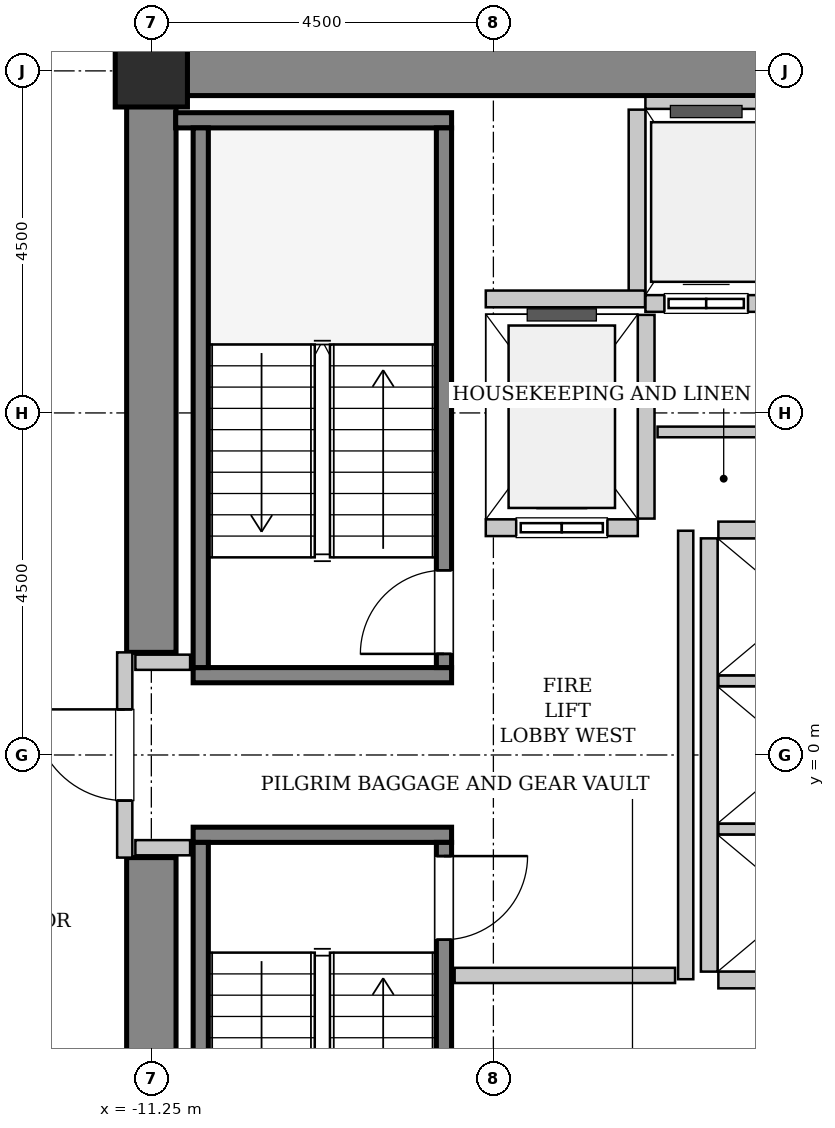
"""IFC4 building model, lengths in metres.
Left out: names, types, materials, properties, quantities, classifications, styles, units other than length and angle.
Written with IfcOpenShell. Run it as: python <this file> out.ifc"""

import sys

from ifc_helpers import new_model, si_unit, direction, frame, frame_2d, origin, origin_2d, place, context, subcontext, project, spatial, rectangle, hollow_rectangle, extrude, source, transform, mapped, element, fill, save


model = new_model("IFC4")
c1 = context("Model", 3, precision=1e-05, world=origin(), true_north=direction((0.0, 1.0)))
c2 = subcontext(c1, "Body", "Model", "MODEL_VIEW")
j1 = project(units=[si_unit("LENGTHUNIT", "METRE"), si_unit("PLANEANGLEUNIT", "RADIAN")], contexts=[c1])
p1 = place(None, origin())
s1 = spatial("IfcSite", under=j1, at=p1, CompositionType="ELEMENT")
p2 = place(p1, origin())
s2 = spatial("IfcBuilding", under=s1, at=p2, CompositionType="ELEMENT")
p3 = place(p2, frame((0.0, 0.0, 52.0)))
s3 = spatial("IfcBuildingStorey", under=s2, at=p3, CompositionType="ELEMENT", Elevation=52.0)
m1 = source(origin(), c2, "Body", "SweptSolid", [
    extrude(rectangle(XDim=10.025, YDim=0.65, at=frame_2d((5.012, 0.0))), origin(), (0.0, 0.0, 1.0), 3.8),
])
p4 = place(p3, frame((-11.575, 9.0, 0.0), z_axis=(0.0, 0.0, 1.0), x_axis=(1.0, 0.0, 0.0)))
e1 = element("IfcWall", 1, at=p4, inside=s3, PredefinedType="SHEAR", context=c2, shape_type="MappedRepresentation", body=[
    mapped(m1, transform((0.0, 0.0, 0.0), x_axis=(1.0, 0.0, 0.0), y_axis=(0.0, 1.0, 0.0), z_axis=(0.0, 0.0, 1.0), scale=1.0)),
])
m2 = source(origin(), c2, "Body", "SweptSolid", [
    extrude(rectangle(XDim=7.325, YDim=0.65, at=frame_2d((3.663, 0.0))), origin(), (0.0, 0.0, 1.0), 3.8),
])
for number, where, z_axis, x_axis in (
    (2, (-11.25, -8.675, 0.0), (0.0, 0.0, 1.0), (0.0, 1.0, 0.0)),
    (3, (-11.25, 1.35, 0.0), (0.0, 0.0, 1.0), (0.0, 1.0, 0.0)),
):
    element("IfcWall", number, at=place(p3, frame(where, z_axis=z_axis, x_axis=x_axis)), inside=s3, PredefinedType="SHEAR", context=c2, shape_type="MappedRepresentation", body=[
        mapped(m2, transform((0.0, 0.0, 0.0), x_axis=(1.0, 0.0, 0.0), y_axis=(0.0, 1.0, 0.0), z_axis=(0.0, 0.0, 1.0), scale=1.0)),
    ])
m3 = source(origin(), c2, "Body", "SweptSolid", [
    extrude(hollow_rectangle(XDim=0.95, YDim=0.95, WallThickness=0.045, InnerFilletRadius=0.045, OuterFilletRadius=0.09, at=origin_2d()), origin(), (0.0, 0.0, 1.0), 3.8),
])
p5 = place(p3, frame((-11.25, 9.0, 0.0), z_axis=(0.0, 0.0, 1.0), x_axis=(1.0, 0.0, 0.0)))
e4 = element("IfcColumn", 4, at=p5, inside=s3, PredefinedType="COLUMN", context=c2, shape_type="MappedRepresentation", body=[
    mapped(m3, transform((0.0, 0.0, 0.0), x_axis=(1.0, 0.0, 0.0), y_axis=(0.0, 1.0, 0.0), z_axis=(0.0, 0.0, 1.0), scale=1.0)),
])
m4 = source(origin(), c2, "Body", "SweptSolid", [
    extrude(rectangle(XDim=3.4, YDim=0.2, at=frame_2d((1.7, 0.0))), origin(), (0.0, 0.0, 1.0), 3.8),
])
p6 = place(p3, frame((-7.3, 1.05, 0.0), z_axis=(0.0, 0.0, 1.0), x_axis=(-1.0, 0.0, 0.0)))
e5 = element("IfcWall", 5, at=p6, inside=s3, PredefinedType="SOLIDWALL", context=c2, shape_type="MappedRepresentation", body=[
    mapped(m4, transform((0.0, 0.0, 0.0), x_axis=(1.0, 0.0, 0.0), y_axis=(0.0, 1.0, 0.0), z_axis=(0.0, 0.0, 1.0), scale=1.0)),
])
m5 = source(origin(), c2, "Body", "SweptSolid", [
    extrude(rectangle(XDim=3.63, YDim=0.2, at=frame_2d((1.815, 0.0))), origin(), (0.0, 0.0, 1.0), 3.8),
])
p7 = place(p3, frame((-7.3, 8.35, 0.0), z_axis=(0.0, 0.0, 1.0), x_axis=(-1.0, 0.0, 0.0)))
e6 = element("IfcWall", 6, at=p7, inside=s3, PredefinedType="SOLIDWALL", context=c2, shape_type="MappedRepresentation", body=[
    mapped(m5, transform((0.0, 0.0, 0.0), x_axis=(1.0, 0.0, 0.0), y_axis=(0.0, 1.0, 0.0), z_axis=(0.0, 0.0, 1.0), scale=1.0)),
])
m6 = source(origin(), c2, "Body", "SweptSolid", [
    extrude(rectangle(XDim=7.1, YDim=0.2, at=frame_2d((3.55, 0.0))), origin(), (0.0, 0.0, 1.0), 3.8),
])
p8 = place(p3, frame((-7.4, 1.15, 0.0), z_axis=(0.0, 0.0, 1.0), x_axis=(0.0, 1.0, 0.0)))
e7 = element("IfcWall", 7, at=p8, inside=s3, PredefinedType="SOLIDWALL", context=c2, shape_type="MappedRepresentation", body=[
    mapped(m6, transform((0.0, 0.0, 0.0), x_axis=(1.0, 0.0, 0.0), y_axis=(0.0, 1.0, 0.0), z_axis=(0.0, 0.0, 1.0), scale=1.0)),
])
p9 = place(p8, frame((0.18, 0.0, 0.0)))
e8 = element("IfcOpeningElement", 8, at=p9, cuts=e7, PredefinedType="OPENING", context=c2, shape_type="SweptSolid", body=[
    extrude(rectangle(XDim=1.1, YDim=2.15, at=frame_2d((0.55, 1.075))), frame((0.0, 0.11, 0.0), z_axis=(0.0, -1.0, 0.0), x_axis=(1.0, 0.0, 0.0)), (0.0, 0.0, 1.0), 0.22),
])
p10 = place(p3, frame((-10.6, 1.15, 0.0), z_axis=(0.0, 0.0, 1.0), x_axis=(0.0, 1.0, 0.0)))
e9 = element("IfcWall", 9, at=p10, inside=s3, PredefinedType="SOLIDWALL", context=c2, shape_type="MappedRepresentation", body=[
    mapped(m6, transform((0.0, 0.0, 0.0), x_axis=(1.0, 0.0, 0.0), y_axis=(0.0, 1.0, 0.0), z_axis=(0.0, 0.0, 1.0), scale=1.0)),
])
p11 = place(p3, frame((-10.7, -1.05, 0.0), z_axis=(0.0, 0.0, 1.0), x_axis=(1.0, 0.0, 0.0)))
e10 = element("IfcWall", 10, at=p11, inside=s3, PredefinedType="SOLIDWALL", context=c2, shape_type="MappedRepresentation", body=[
    mapped(m4, transform((0.0, 0.0, 0.0), x_axis=(1.0, 0.0, 0.0), y_axis=(0.0, 1.0, 0.0), z_axis=(0.0, 0.0, 1.0), scale=1.0)),
])
p12 = place(p3, frame((-10.6, -1.15, 0.0), z_axis=(0.0, 0.0, 1.0), x_axis=(0.0, -1.0, 0.0)))
e11 = element("IfcWall", 11, at=p12, inside=s3, PredefinedType="SOLIDWALL", context=c2, shape_type="MappedRepresentation", body=[
    mapped(m6, transform((0.0, 0.0, 0.0), x_axis=(1.0, 0.0, 0.0), y_axis=(0.0, 1.0, 0.0), z_axis=(0.0, 0.0, 1.0), scale=1.0)),
])
p13 = place(p3, frame((-7.4, -1.15, 0.0), z_axis=(0.0, 0.0, 1.0), x_axis=(0.0, -1.0, 0.0)))
e12 = element("IfcWall", 12, at=p13, inside=s3, PredefinedType="SOLIDWALL", context=c2, shape_type="MappedRepresentation", body=[
    mapped(m6, transform((0.0, 0.0, 0.0), x_axis=(1.0, 0.0, 0.0), y_axis=(0.0, 1.0, 0.0), z_axis=(0.0, 0.0, 1.0), scale=1.0)),
])
p14 = place(p13, frame((0.18, 0.0, 0.0)))
e13 = element("IfcOpeningElement", 13, at=p14, cuts=e12, PredefinedType="OPENING", context=c2, shape_type="SweptSolid", body=[
    extrude(rectangle(XDim=1.1, YDim=2.15, at=frame_2d((0.55, 1.075))), frame((0.0, 0.11, 0.0), z_axis=(0.0, -1.0, 0.0), x_axis=(1.0, 0.0, 0.0)), (0.0, 0.0, 1.0), 0.22),
])
m7 = source(origin(), c2, "Body", "SweptSolid", [
    extrude(rectangle(XDim=2.0, YDim=0.22, at=frame_2d((1.0, 0.0))), origin(), (0.0, 0.0, 1.0), 3.535),
])
p15 = place(p3, frame((-6.85, 2.99, 0.0), z_axis=(0.0, 0.0, 1.0), x_axis=(1.0, 0.0, 0.0)))
e14 = element("IfcWall", 14, at=p15, inside=s3, PredefinedType="SOLIDWALL", context=c2, shape_type="MappedRepresentation", body=[
    mapped(m7, transform((0.0, 0.0, 0.0), x_axis=(1.0, 0.0, 0.0), y_axis=(0.0, 1.0, 0.0), z_axis=(0.0, 0.0, 1.0), scale=1.0)),
])
p16 = place(p15, frame((0.4, 0.0, 0.0)))
e15 = element("IfcOpeningElement", 15, at=p16, cuts=e14, PredefinedType="OPENING", context=c2, shape_type="SweptSolid", body=[
    extrude(rectangle(XDim=1.2, YDim=2.2, at=frame_2d((0.6, 1.1))), frame((0.0, 0.12, 0.0), z_axis=(0.0, -1.0, 0.0), x_axis=(1.0, 0.0, 0.0)), (0.0, 0.0, 1.0), 0.24),
])
m8 = source(origin(), c2, "Body", "SweptSolid", [
    extrude(rectangle(XDim=2.68, YDim=0.22, at=frame_2d((1.34, 0.0))), origin(), (0.0, 0.0, 1.0), 3.535),
])
p17 = place(p3, frame((-4.74, 3.11, 0.0), z_axis=(0.0, 0.0, 1.0), x_axis=(0.0, 1.0, 0.0)))
e16 = element("IfcWall", 16, at=p17, inside=s3, PredefinedType="SOLIDWALL", context=c2, shape_type="MappedRepresentation", body=[
    mapped(m8, transform((0.0, 0.0, 0.0), x_axis=(1.0, 0.0, 0.0), y_axis=(0.0, 1.0, 0.0), z_axis=(0.0, 0.0, 1.0), scale=1.0)),
])
m9 = source(origin(), c2, "Body", "SweptSolid", [
    extrude(rectangle(XDim=3.2, YDim=0.22, at=frame_2d((1.6, 0.0))), origin(), (0.0, 0.0, 1.0), 3.535),
])
p18 = place(p3, frame((-4.75, 5.94, 0.0), z_axis=(0.0, 0.0, 1.0), x_axis=(1.0, 0.0, 0.0)))
e17 = element("IfcWall", 17, at=p18, inside=s3, PredefinedType="SOLIDWALL", context=c2, shape_type="MappedRepresentation", body=[
    mapped(m9, transform((0.0, 0.0, 0.0), x_axis=(1.0, 0.0, 0.0), y_axis=(0.0, 1.0, 0.0), z_axis=(0.0, 0.0, 1.0), scale=1.0)),
])
p19 = place(p18, frame((0.25, 0.0, 0.0)))
e18 = element("IfcOpeningElement", 18, at=p19, cuts=e17, PredefinedType="OPENING", context=c2, shape_type="SweptSolid", body=[
    extrude(rectangle(XDim=1.1, YDim=2.2, at=frame_2d((0.55, 1.1))), frame((0.0, 0.12, 0.0), z_axis=(0.0, -1.0, 0.0), x_axis=(1.0, 0.0, 0.0)), (0.0, 0.0, 1.0), 0.24),
])
p20 = place(p18, frame((1.875, 0.0, 0.0)))
e19 = element("IfcOpeningElement", 19, at=p20, cuts=e17, PredefinedType="OPENING", context=c2, shape_type="SweptSolid", body=[
    extrude(rectangle(XDim=1.1, YDim=2.2, at=frame_2d((0.55, 1.1))), frame((0.0, 0.12, 0.0), z_axis=(0.0, -1.0, 0.0), x_axis=(1.0, 0.0, 0.0)), (0.0, 0.0, 1.0), 0.24),
])
m10 = source(origin(), c2, "Body", "SweptSolid", [
    extrude(rectangle(XDim=3.2, YDim=0.16, at=frame_2d((1.6, 0.0))), origin(), (0.0, 0.0, 1.0), 2.425),
])
p21 = place(p3, frame((-1.55, 8.58, 0.0), z_axis=(0.0, 0.0, 1.0), x_axis=(-1.0, 0.0, 0.0)))
e20 = element("IfcWall", 20, at=p21, inside=s3, PredefinedType="PARTITIONING", context=c2, shape_type="MappedRepresentation", body=[
    mapped(m10, transform((0.0, 0.0, 0.0), x_axis=(1.0, 0.0, 0.0), y_axis=(0.0, 1.0, 0.0), z_axis=(0.0, 0.0, 1.0), scale=1.0)),
])
m11 = source(origin(), c2, "Body", "SweptSolid", [
    extrude(rectangle(XDim=2.43, YDim=0.22, at=frame_2d((1.215, 0.0))), origin(), (0.0, 0.0, 1.0), 3.535),
])
p22 = place(p3, frame((-4.86, 8.49, 0.0), z_axis=(0.0, 0.0, 1.0), x_axis=(0.0, -1.0, 0.0)))
e21 = element("IfcWall", 21, at=p22, inside=s3, PredefinedType="SOLIDWALL", context=c2, shape_type="MappedRepresentation", body=[
    mapped(m11, transform((0.0, 0.0, 0.0), x_axis=(1.0, 0.0, 0.0), y_axis=(0.0, 1.0, 0.0), z_axis=(0.0, 0.0, 1.0), scale=1.0)),
])
m12 = source(origin(), c2, "Body", "SweptSolid", [
    extrude(rectangle(XDim=5.7, YDim=0.22, at=frame_2d((2.85, 0.0))), origin(), (0.0, 0.0, 1.0), 3.535),
])
p23 = place(p3, frame((-3.91, 2.85, 0.0), z_axis=(0.0, 0.0, 1.0), x_axis=(0.0, -1.0, 0.0)))
e22 = element("IfcWall", 22, at=p23, inside=s3, PredefinedType="SOLIDWALL", context=c2, shape_type="MappedRepresentation", body=[
    mapped(m12, transform((0.0, 0.0, 0.0), x_axis=(1.0, 0.0, 0.0), y_axis=(0.0, 1.0, 0.0), z_axis=(0.0, 0.0, 1.0), scale=1.0)),
])
m13 = source(origin(), c2, "Body", "SweptSolid", [
    extrude(rectangle(XDim=2.13, YDim=0.22, at=frame_2d((1.065, 0.0))), origin(), (0.0, 0.0, 1.0), 3.535),
])
p24 = place(p3, frame((-3.79, -2.96, 0.0), z_axis=(0.0, 0.0, 1.0), x_axis=(1.0, 0.0, 0.0)))
e23 = element("IfcWall", 23, at=p24, inside=s3, PredefinedType="SOLIDWALL", context=c2, shape_type="MappedRepresentation", body=[
    mapped(m13, transform((0.0, 0.0, 0.0), x_axis=(1.0, 0.0, 0.0), y_axis=(0.0, 1.0, 0.0), z_axis=(0.0, 0.0, 1.0), scale=1.0)),
])
m14 = source(origin(), c2, "Body", "SweptSolid", [
    extrude(rectangle(XDim=2.13, YDim=0.14, at=frame_2d((1.065, 0.0))), origin(), (0.0, 0.0, 1.0), 3.535),
])
for number, where, z_axis, x_axis in (
    (24, (-3.79, -0.975, 0.0), (0.0, 0.0, 1.0), (1.0, 0.0, 0.0)),
    (25, (-3.79, 0.975, 0.0), (0.0, 0.0, 1.0), (1.0, 0.0, 0.0)),
):
    element("IfcWall", number, at=place(p3, frame(where, z_axis=z_axis, x_axis=x_axis)), inside=s3, PredefinedType="PARTITIONING", context=c2, shape_type="MappedRepresentation", body=[
        mapped(m14, transform((0.0, 0.0, 0.0), x_axis=(1.0, 0.0, 0.0), y_axis=(0.0, 1.0, 0.0), z_axis=(0.0, 0.0, 1.0), scale=1.0)),
    ])
p25 = place(p3, frame((-1.66, 2.96, 0.0), z_axis=(0.0, 0.0, 1.0), x_axis=(-1.0, 0.0, 0.0)))
e26 = element("IfcWall", 26, at=p25, inside=s3, PredefinedType="SOLIDWALL", context=c2, shape_type="MappedRepresentation", body=[
    mapped(m13, transform((0.0, 0.0, 0.0), x_axis=(1.0, 0.0, 0.0), y_axis=(0.0, 1.0, 0.0), z_axis=(0.0, 0.0, 1.0), scale=1.0)),
])
m15 = source(origin(), c2, "Body", "SweptSolid", [
    extrude(rectangle(XDim=2.095, YDim=0.22, at=frame_2d((1.048, 0.0))), origin(), (0.0, 0.0, 1.0), 3.535),
])
p26 = place(p3, frame((-6.85, 6.0, 0.0), z_axis=(0.0, 0.0, 1.0), x_axis=(1.0, 0.0, 0.0)))
e27 = element("IfcWall", 27, at=p26, inside=s3, PredefinedType="SOLIDWALL", context=c2, shape_type="MappedRepresentation", body=[
    mapped(m15, transform((0.0, 0.0, 0.0), x_axis=(1.0, 0.0, 0.0), y_axis=(0.0, 1.0, 0.0), z_axis=(0.0, 0.0, 1.0), scale=1.0)),
])
m16 = source(origin(), c2, "Body", "SweptSolid", [
    extrude(rectangle(XDim=2.7, YDim=0.2, at=frame_2d((1.35, 0.0))), origin(), (0.0, 0.0, 1.0), 2.425),
])
p27 = place(p3, frame((-11.6, -1.35, 0.0), z_axis=(0.0, 0.0, 1.0), x_axis=(0.0, 1.0, 0.0)))
e28 = element("IfcWall", 28, at=p27, inside=s3, PredefinedType="PARTITIONING", context=c2, shape_type="MappedRepresentation", body=[
    mapped(m16, transform((0.0, 0.0, 0.0), x_axis=(1.0, 0.0, 0.0), y_axis=(0.0, 1.0, 0.0), z_axis=(0.0, 0.0, 1.0), scale=1.0)),
])
p28 = place(p27, frame((0.75, 0.0, 0.0)))
e29 = element("IfcOpeningElement", 29, at=p28, cuts=e28, PredefinedType="OPENING", context=c2, shape_type="SweptSolid", body=[
    extrude(rectangle(XDim=1.2, YDim=2.15, at=frame_2d((0.6, 1.075))), frame((0.0, 0.11, 0.0), z_axis=(0.0, -1.0, 0.0), x_axis=(1.0, 0.0, 0.0)), (0.0, 0.0, 1.0), 0.22),
])
m17 = source(origin(), c2, "Body", "SweptSolid", [
    extrude(rectangle(XDim=5.9, YDim=0.2, at=frame_2d((2.95, 0.0))), origin(), (0.0, 0.0, 1.0), 3.535),
])
p29 = place(p3, frame((-4.22, -2.95, 0.0), z_axis=(0.0, 0.0, 1.0), x_axis=(0.0, 1.0, 0.0)))
e30 = element("IfcWall", 30, at=p29, inside=s3, PredefinedType="PARTITIONING", context=c2, shape_type="MappedRepresentation", body=[
    mapped(m17, transform((0.0, 0.0, 0.0), x_axis=(1.0, 0.0, 0.0), y_axis=(0.0, 1.0, 0.0), z_axis=(0.0, 0.0, 1.0), scale=1.0)),
])
m18 = source(origin(), c2, "Body", "SweptSolid", [
    extrude(rectangle(XDim=2.9, YDim=0.2, at=frame_2d((1.45, 0.0))), origin(), (0.0, 0.0, 1.0), 3.535),
])
p30 = place(p3, frame((-7.26, -2.9, 0.0), z_axis=(0.0, 0.0, 1.0), x_axis=(1.0, 0.0, 0.0)))
e31 = element("IfcWall", 31, at=p30, inside=s3, PredefinedType="PARTITIONING", context=c2, shape_type="MappedRepresentation", body=[
    mapped(m18, transform((0.0, 0.0, 0.0), x_axis=(1.0, 0.0, 0.0), y_axis=(0.0, 1.0, 0.0), z_axis=(0.0, 0.0, 1.0), scale=1.0)),
])
m19 = source(origin(), c2, "Body", "SweptSolid", [
    extrude(rectangle(XDim=0.72, YDim=0.2, at=frame_2d((0.36, 0.0))), origin(), (0.0, 0.0, 1.0), 3.535),
])
for number, where, z_axis, x_axis in (
    (32, (-11.46, 1.22, 0.0), (0.0, 0.0, 1.0), (1.0, 0.0, 0.0)),
    (33, (-11.46, -1.22, 0.0), (0.0, 0.0, 1.0), (1.0, 0.0, 0.0)),
):
    element("IfcWall", number, at=place(p3, frame(where, z_axis=z_axis, x_axis=x_axis)), inside=s3, PredefinedType="PARTITIONING", context=c2, shape_type="MappedRepresentation", body=[
        mapped(m19, transform((0.0, 0.0, 0.0), x_axis=(1.0, 0.0, 0.0), y_axis=(0.0, 1.0, 0.0), z_axis=(0.0, 0.0, 1.0), scale=1.0)),
    ])
m20 = source(origin(), c2, "Body", "SweptSolid", [
    extrude(rectangle(XDim=2.95, YDim=0.14, at=frame_2d((1.475, 0.0))), origin(), (0.0, 0.0, 1.0), 3.535),
])
p31 = place(p3, frame((-4.59, 4.25, 0.0), z_axis=(0.0, 0.0, 1.0), x_axis=(1.0, 0.0, 0.0)))
e34 = element("IfcWall", 34, at=p31, inside=s3, PredefinedType="PARTITIONING", context=c2, shape_type="MappedRepresentation", body=[
    mapped(m20, transform((0.0, 0.0, 0.0), x_axis=(1.0, 0.0, 0.0), y_axis=(0.0, 1.0, 0.0), z_axis=(0.0, 0.0, 1.0), scale=1.0)),
])
m21 = source(origin(), c2, "Body", "SweptSolid", [
    extrude(rectangle(XDim=1.1, YDim=2.15, at=frame_2d((0.55, 1.075))), frame((0.0, 0.025, 0.0), z_axis=(0.0, -1.0, 0.0), x_axis=(1.0, 0.0, 0.0)), (0.0, 0.0, 1.0), 0.05),
])
p32 = place(p9, origin())
e35 = element("IfcDoor", 35, at=p32, inside=s3, OperationType="SINGLE_SWING_LEFT", PredefinedType="DOOR", context=c2, shape_type="MappedRepresentation", body=[
    mapped(m21, transform((0.0, 0.0, 0.0), x_axis=(1.0, 0.0, 0.0), y_axis=(0.0, 1.0, 0.0), z_axis=(0.0, 0.0, 1.0), scale=1.0)),
])
fill(e8, e35)
p33 = place(p14, origin())
e36 = element("IfcDoor", 36, at=p33, inside=s3, OperationType="SINGLE_SWING_LEFT", PredefinedType="DOOR", context=c2, shape_type="MappedRepresentation", body=[
    mapped(m21, transform((0.0, 0.0, 0.0), x_axis=(1.0, 0.0, 0.0), y_axis=(0.0, 1.0, 0.0), z_axis=(0.0, 0.0, 1.0), scale=1.0)),
])
fill(e13, e36)
m22 = source(origin(), c2, "Body", "SweptSolid", [
    extrude(rectangle(XDim=1.2, YDim=2.2, at=frame_2d((0.6, 1.1))), frame((0.0, 0.025, 0.0), z_axis=(0.0, -1.0, 0.0), x_axis=(1.0, 0.0, 0.0)), (0.0, 0.0, 1.0), 0.05),
])
p34 = place(p16, origin())
e37 = element("IfcDoor", 37, at=p34, inside=s3, OperationType="SLIDING_TO_LEFT", PredefinedType="DOOR", context=c2, shape_type="MappedRepresentation", body=[
    mapped(m22, transform((0.0, 0.0, 0.0), x_axis=(1.0, 0.0, 0.0), y_axis=(0.0, 1.0, 0.0), z_axis=(0.0, 0.0, 1.0), scale=1.0)),
])
fill(e15, e37)
m23 = source(origin(), c2, "Body", "SweptSolid", [
    extrude(rectangle(XDim=1.1, YDim=2.2, at=frame_2d((0.55, 1.1))), frame((0.0, 0.025, 0.0), z_axis=(0.0, -1.0, 0.0), x_axis=(1.0, 0.0, 0.0)), (0.0, 0.0, 1.0), 0.05),
])
p35 = place(p19, origin())
e38 = element("IfcDoor", 38, at=p35, inside=s3, OperationType="DOUBLE_DOOR_SLIDING", PredefinedType="DOOR", context=c2, shape_type="MappedRepresentation", body=[
    mapped(m23, transform((0.0, 0.0, 0.0), x_axis=(1.0, 0.0, 0.0), y_axis=(0.0, 1.0, 0.0), z_axis=(0.0, 0.0, 1.0), scale=1.0)),
])
fill(e18, e38)
m24 = source(origin(), c2, "Body", "SweptSolid", [
    extrude(rectangle(XDim=1.2, YDim=2.15, at=frame_2d((0.6, 1.075))), frame((0.0, 0.025, 0.0), z_axis=(0.0, -1.0, 0.0), x_axis=(1.0, 0.0, 0.0)), (0.0, 0.0, 1.0), 0.05),
])
p36 = place(p28, origin())
e39 = element("IfcDoor", 39, at=p36, inside=s3, OperationType="SINGLE_SWING_RIGHT", PredefinedType="DOOR", context=c2, shape_type="MappedRepresentation", body=[
    mapped(m24, transform((0.0, 0.0, 0.0), x_axis=(1.0, 0.0, 0.0), y_axis=(0.0, 1.0, 0.0), z_axis=(0.0, 0.0, 1.0), scale=1.0)),
])
fill(e29, e39)
save(model, sys.argv[1])
